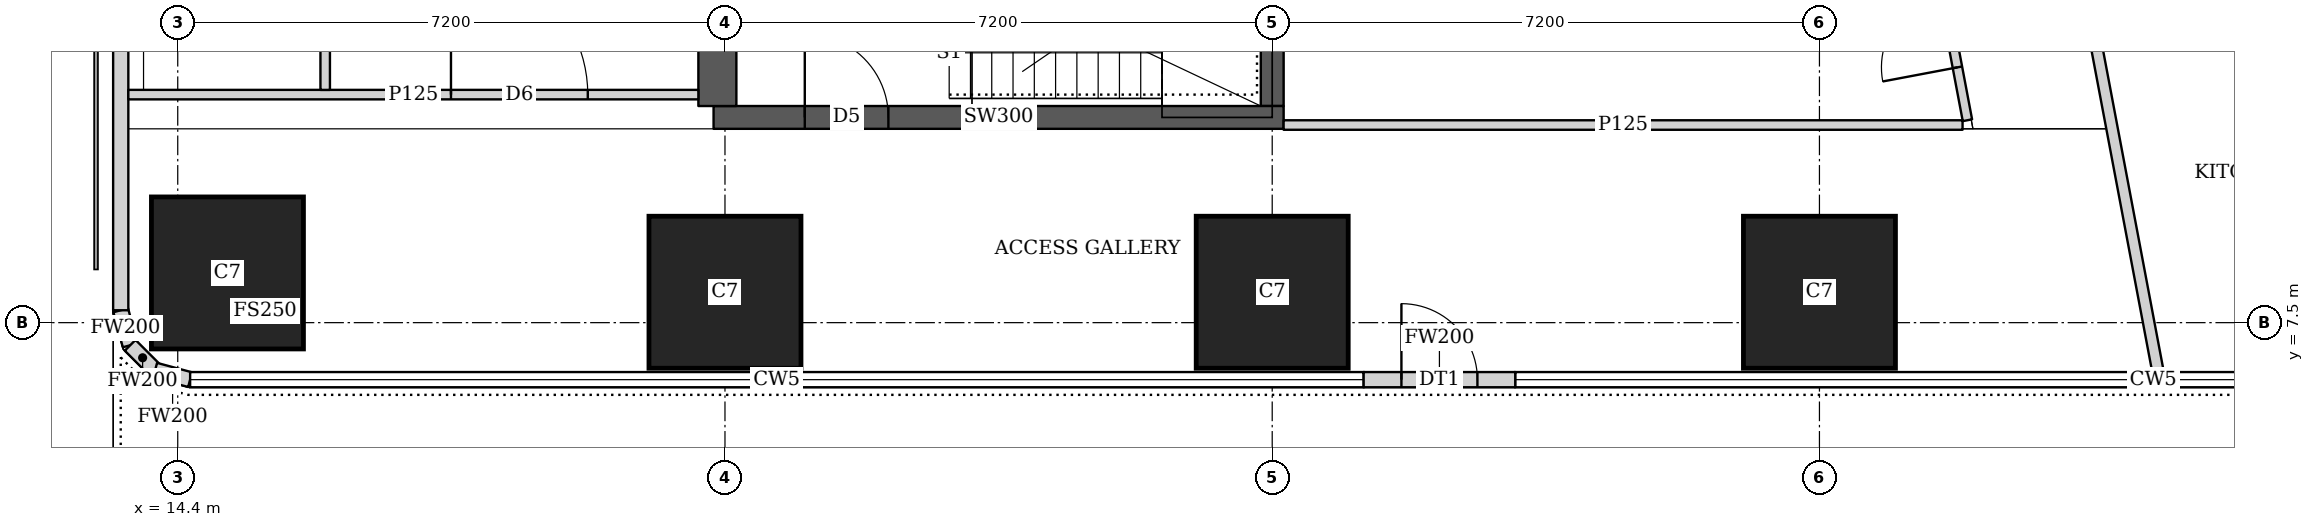
"""IFC4 building model, lengths in metres.
Left out: names, types, materials, properties, quantities, classifications, styles, units other than length and angle.
Written with IfcOpenShell. Run it as: python <this file> out.ifc"""

import sys

from ifc_helpers import new_model, si_unit, direction, frame, frame_2d, origin, origin_2d, place, context, subcontext, project, spatial, rectangle, extrude, element, fill, save


model = new_model("IFC4")
c1 = context("Model", 3, precision=1e-05, world=origin(), true_north=direction((0.0, 1.0)))
c2 = subcontext(c1, "Body", "Model", "MODEL_VIEW")
j1 = project(units=[si_unit("LENGTHUNIT", "METRE"), si_unit("PLANEANGLEUNIT", "RADIAN")], contexts=[c1])
p1 = place(None, origin())
s1 = spatial("IfcSite", under=j1, at=p1, CompositionType="ELEMENT")
p2 = place(p1, origin())
s2 = spatial("IfcBuilding", under=s1, at=p2, CompositionType="ELEMENT")
p3 = place(p2, frame((0.0, 0.0, 251.6)))
s3 = spatial("IfcBuildingStorey", under=s2, at=p3, CompositionType="ELEMENT", Elevation=251.6)
for number, where, z_axis, x_axis in (
    (1, (15.054, 8.154, 0.0), (0.0, 0.0, 1.0), (1.0, 0.0, 0.0)),
    (2, (21.6, 7.9, 0.0), (0.0, 0.0, 1.0), (1.0, 0.0, 0.0)),
    (3, (28.8, 7.9, 0.0), (0.0, 0.0, 1.0), (1.0, 0.0, 0.0)),
    (4, (36.0, 7.9, 0.0), (0.0, 0.0, 1.0), (1.0, 0.0, 0.0)),
):
    element("IfcColumn", number, at=place(p3, frame(where, z_axis=z_axis, x_axis=x_axis)), inside=s3, PredefinedType="COLUMN", context=c2, shape_type="SweptSolid", body=[
        extrude(rectangle(XDim=2.0, YDim=2.0, at=origin_2d()), origin(), (0.0, 0.0, 1.0), 3.75),
    ])
p4 = place(p3, frame((21.45, 10.2, 0.0), z_axis=(0.0, 0.0, 1.0), x_axis=(1.0, 0.0, 0.0)))
e5 = element("IfcWall", 5, at=p4, inside=s3, PredefinedType="SHEAR", context=c2, shape_type="SweptSolid", body=[
    extrude(rectangle(XDim=7.5, YDim=0.3, at=frame_2d((3.75, 0.0))), origin(), (0.0, 0.0, 1.0), 3.75),
])
p5 = place(p4, frame((1.2, 0.0, 0.0)))
e6 = element("IfcOpeningElement", 6, at=p5, cuts=e5, PredefinedType="OPENING", context=c2, shape_type="SweptSolid", body=[
    extrude(rectangle(XDim=1.1, YDim=2.1, at=frame_2d((0.55, 1.05))), frame((0.0, 0.16, 0.0), z_axis=(0.0, -1.0, 0.0), x_axis=(1.0, 0.0, 0.0)), (0.0, 0.0, 1.0), 0.32),
])
p6 = place(p3, frame((21.5, 10.35, 0.0), z_axis=(0.0, 0.0, 1.0), x_axis=(0.0, 1.0, 0.0)))
e7 = element("IfcWall", 7, at=p6, inside=s3, PredefinedType="SHEAR", context=c2, shape_type="SweptSolid", body=[
    extrude(rectangle(XDim=4.2, YDim=0.5, at=frame_2d((2.1, 0.0))), origin(), (0.0, 0.0, 1.0), 3.75),
])
p7 = place(p3, frame((28.8, 10.35, 0.0), z_axis=(0.0, 0.0, 1.0), x_axis=(0.0, 1.0, 0.0)))
e8 = element("IfcWall", 8, at=p7, inside=s3, PredefinedType="SHEAR", context=c2, shape_type="SweptSolid", body=[
    extrude(rectangle(XDim=4.2, YDim=0.3, at=frame_2d((2.1, 0.0))), origin(), (0.0, 0.0, 1.0), 3.75),
])
p8 = place(p3, frame((30.0, 6.75, 0.0), z_axis=(0.0, 0.0, 1.0), x_axis=(1.0, 0.0, 0.0)))
e9 = element("IfcWall", 9, at=p8, inside=s3, PredefinedType="SOLIDWALL", context=c2, shape_type="SweptSolid", body=[
    extrude(rectangle(XDim=2.0, YDim=0.2, at=frame_2d((1.0, 0.0))), origin(), (0.0, 0.0, 1.0), 3.5),
])
p9 = place(p8, frame((0.5, 0.0, 0.0)))
e10 = element("IfcOpeningElement", 10, at=p9, cuts=e9, PredefinedType="OPENING", context=c2, shape_type="SweptSolid", body=[
    extrude(rectangle(XDim=1.0, YDim=2.4, at=frame_2d((0.5, 1.2))), frame((0.0, 0.11, 0.0), z_axis=(0.0, -1.0, 0.0), x_axis=(1.0, 0.0, 0.0)), (0.0, 0.0, 1.0), 0.22),
])
p10 = place(p3, frame((13.65, 43.037, 0.0), z_axis=(0.0, 0.0, 1.0), x_axis=(0.0, -1.0, 0.0)))
e11 = element("IfcWall", 11, at=p10, inside=s3, PredefinedType="SOLIDWALL", context=c2, shape_type="SweptSolid", body=[
    extrude(rectangle(XDim=35.374, YDim=0.2, at=frame_2d((17.687, 0.0))), origin(), (0.0, 0.0, 1.0), 3.5),
])
p11 = place(p10, frame((1.959, 0.0, 0.9)))
e12 = element("IfcOpeningElement", 12, at=p11, cuts=e11, PredefinedType="OPENING", context=c2, shape_type="SweptSolid", body=[
    extrude(rectangle(XDim=1.8, YDim=1.5, at=frame_2d((0.9, 0.75))), frame((0.0, 0.11, 0.0), z_axis=(0.0, -1.0, 0.0), x_axis=(1.0, 0.0, 0.0)), (0.0, 0.0, 1.0), 0.22),
])
p12 = place(p3, frame((13.65, 7.663, 0.0), z_axis=(0.0, 0.0, 1.0), x_axis=(0.259698463175, -0.965689757751, 0.0)))
e13 = element("IfcWall", 13, at=p12, inside=s3, PredefinedType="SOLIDWALL", context=c2, shape_type="SweptSolid", body=[
    extrude(rectangle(XDim=0.478, YDim=0.2, at=frame_2d((0.239, 0.0))), origin(), (0.0, 0.0, 1.0), 3.5),
])
p13 = place(p3, frame((13.774, 7.202, 0.0), z_axis=(0.0, 0.0, 1.0), x_axis=(0.707369890659, -0.706843573776, 0.0)))
e14 = element("IfcWall", 14, at=p13, inside=s3, PredefinedType="SOLIDWALL", context=c2, shape_type="SweptSolid", body=[
    extrude(rectangle(XDim=0.464, YDim=0.2, at=frame_2d((0.232, 0.0))), origin(), (0.0, 0.0, 1.0), 3.5),
])
p14 = place(p3, frame((14.102, 6.874, 0.0), z_axis=(0.0, 0.0, 1.0), x_axis=(0.965655254015, -0.259826731483, 0.0)))
e15 = element("IfcWall", 15, at=p14, inside=s3, PredefinedType="SOLIDWALL", context=c2, shape_type="SweptSolid", body=[
    extrude(rectangle(XDim=0.477, YDim=0.2, at=frame_2d((0.239, 0.0))), origin(), (0.0, 0.0, 1.0), 3.5),
])
p15 = place(p3, frame((33.781, 42.186, 0.0), z_axis=(0.0, 0.0, 1.0), x_axis=(0.185593518645, -0.9826266055, 0.0)))
e16 = element("IfcWall", 16, at=p15, inside=s3, PredefinedType="SOLIDWALL", context=c2, shape_type="SweptSolid", body=[
    extrude(rectangle(XDim=35.961, YDim=0.15, at=frame_2d((17.98, 0.0))), origin(), (0.0, 0.0, 1.0), 2.5),
])
p16 = place(p15, frame((7.183, 0.0, 0.0)))
e17 = element("IfcOpeningElement", 17, at=p16, cuts=e16, PredefinedType="OPENING", context=c2, shape_type="SweptSolid", body=[
    extrude(rectangle(XDim=1.0, YDim=2.1, at=frame_2d((0.5, 1.05))), frame((0.0, 0.085, 0.0), z_axis=(0.0, -1.0, 0.0), x_axis=(1.0, 0.0, 0.0)), (0.0, 0.0, 1.0), 0.17),
])
p17 = place(p15, frame((11.76, 0.0, 0.0)))
e18 = element("IfcOpeningElement", 18, at=p17, cuts=e16, PredefinedType="OPENING", context=c2, shape_type="SweptSolid", body=[
    extrude(rectangle(XDim=1.0, YDim=2.1, at=frame_2d((0.5, 1.05))), frame((0.0, 0.085, 0.0), z_axis=(0.0, -1.0, 0.0), x_axis=(1.0, 0.0, 0.0)), (0.0, 0.0, 1.0), 0.17),
])
p18 = place(p15, frame((23.863, 0.0, 0.0)))
e19 = element("IfcOpeningElement", 19, at=p18, cuts=e16, PredefinedType="OPENING", context=c2, shape_type="SweptSolid", body=[
    extrude(rectangle(XDim=1.0, YDim=2.1, at=frame_2d((0.5, 1.05))), frame((0.0, 0.085, 0.0), z_axis=(0.0, -1.0, 0.0), x_axis=(1.0, 0.0, 0.0)), (0.0, 0.0, 1.0), 0.17),
])
p19 = place(p15, frame((30.502, 0.0, 0.0)))
e20 = element("IfcOpeningElement", 20, at=p19, cuts=e16, PredefinedType="OPENING", context=c2, shape_type="SweptSolid", body=[
    extrude(rectangle(XDim=1.0, YDim=2.1, at=frame_2d((0.5, 1.05))), frame((0.0, 0.085, 0.0), z_axis=(0.0, -1.0, 0.0), x_axis=(1.0, 0.0, 0.0)), (0.0, 0.0, 1.0), 0.17),
])
p20 = place(p3, frame((13.75, 10.5, 0.0), z_axis=(0.0, 0.0, 1.0), x_axis=(1.0, 0.0, 0.0)))
e21 = element("IfcWall", 21, at=p20, inside=s3, PredefinedType="PARTITIONING", context=c2, shape_type="SweptSolid", body=[
    extrude(rectangle(XDim=7.5, YDim=0.125, at=frame_2d((3.75, 0.0))), origin(), (0.0, 0.0, 1.0), 3.5),
])
p21 = place(p20, frame((4.245, 0.0, 0.0)))
e22 = element("IfcOpeningElement", 22, at=p21, cuts=e21, PredefinedType="OPENING", context=c2, shape_type="SweptSolid", body=[
    extrude(rectangle(XDim=1.8, YDim=2.1, at=frame_2d((0.9, 1.05))), frame((0.0, 0.073, 0.0), z_axis=(0.0, -1.0, 0.0), x_axis=(1.0, 0.0, 0.0)), (0.0, 0.0, 1.0), 0.145),
])
p22 = place(p3, frame((16.34, 10.562, 0.0), z_axis=(0.0, 0.0, 1.0), x_axis=(0.0, 1.0, 0.0)))
e23 = element("IfcWall", 23, at=p22, inside=s3, PredefinedType="PARTITIONING", context=c2, shape_type="SweptSolid", body=[
    extrude(rectangle(XDim=3.988, YDim=0.125, at=frame_2d((1.994, 0.0))), origin(), (0.0, 0.0, 1.0), 3.5),
])
p23 = place(p22, frame((1.438, 0.0, 0.0)))
e24 = element("IfcOpeningElement", 24, at=p23, cuts=e23, PredefinedType="OPENING", context=c2, shape_type="SweptSolid", body=[
    extrude(rectangle(XDim=1.0, YDim=2.1, at=frame_2d((0.5, 1.05))), frame((0.0, 0.073, 0.0), z_axis=(0.0, -1.0, 0.0), x_axis=(1.0, 0.0, 0.0)), (0.0, 0.0, 1.0), 0.145),
])
p24 = place(p3, frame((28.95, 10.1, 0.0), z_axis=(0.0, 0.0, 1.0), x_axis=(1.0, 0.0, 0.0)))
e25 = element("IfcWall", 25, at=p24, inside=s3, PredefinedType="PARTITIONING", context=c2, shape_type="SweptSolid", body=[
    extrude(rectangle(XDim=8.933, YDim=0.125, at=frame_2d((4.467, 0.0))), origin(), (0.0, 0.0, 1.0), 3.5),
])
p25 = place(p3, frame((37.947, 10.163, 0.0), z_axis=(0.0, 0.0, 1.0), x_axis=(-0.185589250699, 0.982627411599, 0.0)))
e26 = element("IfcWall", 26, at=p25, inside=s3, PredefinedType="PARTITIONING", context=c2, shape_type="SweptSolid", body=[
    extrude(rectangle(XDim=12.555, YDim=0.125, at=frame_2d((6.277, 0.0))), origin(), (0.0, 0.0, 1.0), 2.5),
])
p26 = place(p25, frame((0.708, 0.0, 0.0)))
e27 = element("IfcOpeningElement", 27, at=p26, cuts=e26, PredefinedType="OPENING", context=c2, shape_type="SweptSolid", body=[
    extrude(rectangle(XDim=1.0, YDim=2.1, at=frame_2d((0.5, 1.05))), frame((0.0, 0.073, 0.0), z_axis=(0.0, -1.0, 0.0), x_axis=(1.0, 0.0, 0.0)), (0.0, 0.0, 1.0), 0.145),
])
p27 = place(p25, frame((5.9, 0.0, 0.0)))
e28 = element("IfcOpeningElement", 28, at=p27, cuts=e26, PredefinedType="OPENING", context=c2, shape_type="SweptSolid", body=[
    extrude(rectangle(XDim=1.0, YDim=2.1, at=frame_2d((0.5, 1.05))), frame((0.0, 0.073, 0.0), z_axis=(0.0, -1.0, 0.0), x_axis=(1.0, 0.0, 0.0)), (0.0, 0.0, 1.0), 0.145),
])
p28 = place(p25, frame((9.562, 0.0, 0.0)))
e29 = element("IfcOpeningElement", 29, at=p28, cuts=e26, PredefinedType="OPENING", context=c2, shape_type="SweptSolid", body=[
    extrude(rectangle(XDim=1.0, YDim=2.1, at=frame_2d((0.5, 1.05))), frame((0.0, 0.073, 0.0), z_axis=(0.0, -1.0, 0.0), x_axis=(1.0, 0.0, 0.0)), (0.0, 0.0, 1.0), 0.145),
])
p29 = place(p9, origin())
e30 = element("IfcDoor", 30, at=p29, inside=s3, OperationType="SINGLE_SWING_RIGHT", PredefinedType="DOOR", context=c2, shape_type="SweptSolid", body=[
    extrude(rectangle(XDim=1.0, YDim=2.4, at=frame_2d((0.5, 1.2))), frame((0.0, 0.025, 0.0), z_axis=(0.0, -1.0, 0.0), x_axis=(1.0, 0.0, 0.0)), (0.0, 0.0, 1.0), 0.05),
])
fill(e10, e30)
p30 = place(p21, origin())
e31 = element("IfcDoor", 31, at=p30, inside=s3, OperationType="DOUBLE_DOOR_SINGLE_SWING", PredefinedType="DOOR", context=c2, shape_type="SweptSolid", body=[
    extrude(rectangle(XDim=1.8, YDim=2.1, at=frame_2d((0.9, 1.05))), frame((0.0, 0.025, 0.0), z_axis=(0.0, -1.0, 0.0), x_axis=(1.0, 0.0, 0.0)), (0.0, 0.0, 1.0), 0.05),
])
fill(e22, e31)
p31 = place(p26, origin())
e32 = element("IfcDoor", 32, at=p31, inside=s3, OperationType="SINGLE_SWING_LEFT", PredefinedType="DOOR", context=c2, shape_type="SweptSolid", body=[
    extrude(rectangle(XDim=1.0, YDim=2.1, at=frame_2d((0.5, 1.05))), frame((0.0, 0.025, 0.0), z_axis=(0.0, -1.0, 0.0), x_axis=(1.0, 0.0, 0.0)), (0.0, 0.0, 1.0), 0.05),
])
fill(e27, e32)
p32 = place(p5, origin())
e33 = element("IfcDoor", 33, at=p32, inside=s3, OperationType="SINGLE_SWING_LEFT", PredefinedType="DOOR", context=c2, shape_type="SweptSolid", body=[
    extrude(rectangle(XDim=1.1, YDim=2.1, at=frame_2d((0.55, 1.05))), frame((0.0, 0.025, 0.0), z_axis=(0.0, -1.0, 0.0), x_axis=(1.0, 0.0, 0.0)), (0.0, 0.0, 1.0), 0.05),
])
fill(e6, e33)
save(model, sys.argv[1])
